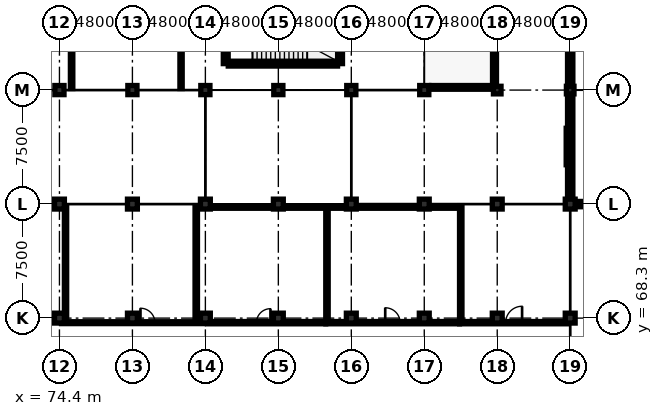
"""IFC4 building model, lengths in metres.
Left out: names, types, materials, properties, quantities, classifications, styles, units other than length and angle.
Written with IfcOpenShell. Run it as: python <this file> out.ifc"""

import sys

from ifc_helpers import new_model, si_unit, direction, frame, frame_2d, origin, origin_2d, place, context, subcontext, project, spatial, rectangle, circle, extrude, element, fill, save


model = new_model("IFC4")
c1 = context("Model", 3, precision=1e-05, world=origin(), true_north=direction((0.0, 1.0)))
c2 = subcontext(c1, "Body", "Model", "MODEL_VIEW")
j1 = project(units=[si_unit("LENGTHUNIT", "METRE"), si_unit("PLANEANGLEUNIT", "RADIAN")], contexts=[c1])
p1 = place(None, origin())
s1 = spatial("IfcSite", under=j1, at=p1, CompositionType="ELEMENT")
p2 = place(p1, origin())
s2 = spatial("IfcBuilding", under=s1, at=p2, CompositionType="ELEMENT")
p3 = place(p2, frame((0.0, 0.0, 5.0)))
s3 = spatial("IfcBuildingStorey", under=s2, at=p3, CompositionType="ELEMENT", Elevation=5.0)
for number, where, z_axis, x_axis in (
    (1, (74.4, 68.3, 0.0), (0.0, 0.0, 1.0), (1.0, 0.0, 0.0)),
    (2, (74.4, 75.8, 0.0), (0.0, 0.0, 1.0), (1.0, 0.0, 0.0)),
):
    element("IfcColumn", number, at=place(p3, frame(where, z_axis=z_axis, x_axis=x_axis)), inside=s3, PredefinedType="COLUMN", context=c2, shape_type="SweptSolid", body=[
        extrude(circle(Radius=0.325, at=origin_2d()), origin(), (0.0, 0.0, 1.0), 4.2),
    ])
p4 = place(p3, frame((74.4, 83.3, 0.0), z_axis=(0.0, 0.0, 1.0), x_axis=(1.0, 0.0, 0.0)))
e3 = element("IfcColumn", 3, at=p4, inside=s3, PredefinedType="COLUMN", context=c2, shape_type="SweptSolid", body=[
    extrude(rectangle(XDim=0.6, YDim=0.6, at=origin_2d()), origin(), (0.0, 0.0, 1.0), 4.2),
])
for number, where, z_axis, x_axis in (
    (4, (79.2, 68.3, 0.0), (0.0, 0.0, 1.0), (1.0, 0.0, 0.0)),
    (5, (79.2, 75.8, 0.0), (0.0, 0.0, 1.0), (1.0, 0.0, 0.0)),
):
    element("IfcColumn", number, at=place(p3, frame(where, z_axis=z_axis, x_axis=x_axis)), inside=s3, PredefinedType="COLUMN", context=c2, shape_type="SweptSolid", body=[
        extrude(circle(Radius=0.325, at=origin_2d()), origin(), (0.0, 0.0, 1.0), 4.2),
    ])
p5 = place(p3, frame((79.2, 83.3, 0.0), z_axis=(0.0, 0.0, 1.0), x_axis=(1.0, 0.0, 0.0)))
e6 = element("IfcColumn", 6, at=p5, inside=s3, PredefinedType="COLUMN", context=c2, shape_type="SweptSolid", body=[
    extrude(rectangle(XDim=0.6, YDim=0.6, at=origin_2d()), origin(), (0.0, 0.0, 1.0), 4.2),
])
for number, where, z_axis, x_axis in (
    (7, (84.0, 68.3, 0.0), (0.0, 0.0, 1.0), (1.0, 0.0, 0.0)),
    (8, (84.0, 75.8, 0.0), (0.0, 0.0, 1.0), (1.0, 0.0, 0.0)),
):
    element("IfcColumn", number, at=place(p3, frame(where, z_axis=z_axis, x_axis=x_axis)), inside=s3, PredefinedType="COLUMN", context=c2, shape_type="SweptSolid", body=[
        extrude(circle(Radius=0.325, at=origin_2d()), origin(), (0.0, 0.0, 1.0), 4.2),
    ])
p6 = place(p3, frame((84.0, 83.3, 0.0), z_axis=(0.0, 0.0, 1.0), x_axis=(1.0, 0.0, 0.0)))
e9 = element("IfcColumn", 9, at=p6, inside=s3, PredefinedType="COLUMN", context=c2, shape_type="SweptSolid", body=[
    extrude(rectangle(XDim=0.6, YDim=0.6, at=origin_2d()), origin(), (0.0, 0.0, 1.0), 4.2),
])
for number, where, z_axis, x_axis in (
    (10, (88.8, 68.3, 0.0), (0.0, 0.0, 1.0), (1.0, 0.0, 0.0)),
    (11, (88.8, 75.8, 0.0), (0.0, 0.0, 1.0), (1.0, 0.0, 0.0)),
):
    element("IfcColumn", number, at=place(p3, frame(where, z_axis=z_axis, x_axis=x_axis)), inside=s3, PredefinedType="COLUMN", context=c2, shape_type="SweptSolid", body=[
        extrude(circle(Radius=0.325, at=origin_2d()), origin(), (0.0, 0.0, 1.0), 4.2),
    ])
p7 = place(p3, frame((88.8, 83.3, 0.0), z_axis=(0.0, 0.0, 1.0), x_axis=(1.0, 0.0, 0.0)))
e12 = element("IfcColumn", 12, at=p7, inside=s3, PredefinedType="COLUMN", context=c2, shape_type="SweptSolid", body=[
    extrude(rectangle(XDim=0.6, YDim=0.6, at=origin_2d()), origin(), (0.0, 0.0, 1.0), 4.2),
])
for number, where, z_axis, x_axis in (
    (13, (93.6, 68.3, 0.0), (0.0, 0.0, 1.0), (1.0, 0.0, 0.0)),
    (14, (93.6, 75.8, 0.0), (0.0, 0.0, 1.0), (1.0, 0.0, 0.0)),
):
    element("IfcColumn", number, at=place(p3, frame(where, z_axis=z_axis, x_axis=x_axis)), inside=s3, PredefinedType="COLUMN", context=c2, shape_type="SweptSolid", body=[
        extrude(circle(Radius=0.325, at=origin_2d()), origin(), (0.0, 0.0, 1.0), 4.2),
    ])
p8 = place(p3, frame((93.6, 83.3, 0.0), z_axis=(0.0, 0.0, 1.0), x_axis=(1.0, 0.0, 0.0)))
e15 = element("IfcColumn", 15, at=p8, inside=s3, PredefinedType="COLUMN", context=c2, shape_type="SweptSolid", body=[
    extrude(rectangle(XDim=0.6, YDim=0.6, at=origin_2d()), origin(), (0.0, 0.0, 1.0), 4.2),
])
for number, where, z_axis, x_axis in (
    (16, (98.4, 68.3, 0.0), (0.0, 0.0, 1.0), (1.0, 0.0, 0.0)),
    (17, (98.4, 75.8, 0.0), (0.0, 0.0, 1.0), (1.0, 0.0, 0.0)),
):
    element("IfcColumn", number, at=place(p3, frame(where, z_axis=z_axis, x_axis=x_axis)), inside=s3, PredefinedType="COLUMN", context=c2, shape_type="SweptSolid", body=[
        extrude(circle(Radius=0.325, at=origin_2d()), origin(), (0.0, 0.0, 1.0), 4.2),
    ])
p9 = place(p3, frame((98.4, 83.3, 0.0), z_axis=(0.0, 0.0, 1.0), x_axis=(1.0, 0.0, 0.0)))
e18 = element("IfcColumn", 18, at=p9, inside=s3, PredefinedType="COLUMN", context=c2, shape_type="SweptSolid", body=[
    extrude(rectangle(XDim=0.6, YDim=0.6, at=origin_2d()), origin(), (0.0, 0.0, 1.0), 4.2),
])
for number, where, z_axis, x_axis in (
    (19, (103.2, 68.3, 0.0), (0.0, 0.0, 1.0), (1.0, 0.0, 0.0)),
    (20, (103.2, 75.8, 0.0), (0.0, 0.0, 1.0), (1.0, 0.0, 0.0)),
):
    element("IfcColumn", number, at=place(p3, frame(where, z_axis=z_axis, x_axis=x_axis)), inside=s3, PredefinedType="COLUMN", context=c2, shape_type="SweptSolid", body=[
        extrude(circle(Radius=0.325, at=origin_2d()), origin(), (0.0, 0.0, 1.0), 4.2),
    ])
p10 = place(p3, frame((103.2, 83.3, 0.0), z_axis=(0.0, 0.0, 1.0), x_axis=(1.0, 0.0, 0.0)))
e21 = element("IfcColumn", 21, at=p10, inside=s3, PredefinedType="COLUMN", context=c2, shape_type="SweptSolid", body=[
    extrude(rectangle(XDim=0.5, YDim=0.5, at=origin_2d()), origin(), (0.0, 0.0, 1.0), 4.2),
])
for number, where, z_axis, x_axis in (
    (22, (108.0, 68.3, 0.0), (0.0, 0.0, 1.0), (1.0, 0.0, 0.0)),
    (23, (108.0, 75.8, 0.0), (0.0, 0.0, 1.0), (1.0, 0.0, 0.0)),
):
    element("IfcColumn", number, at=place(p3, frame(where, z_axis=z_axis, x_axis=x_axis)), inside=s3, PredefinedType="COLUMN", context=c2, shape_type="SweptSolid", body=[
        extrude(circle(Radius=0.325, at=origin_2d()), origin(), (0.0, 0.0, 1.0), 4.2),
    ])
p11 = place(p3, frame((108.0, 83.3, 0.0), z_axis=(0.0, 0.0, 1.0), x_axis=(1.0, 0.0, 0.0)))
e24 = element("IfcColumn", 24, at=p11, inside=s3, PredefinedType="COLUMN", context=c2, shape_type="SweptSolid", body=[
    extrude(rectangle(XDim=0.5, YDim=0.5, at=origin_2d()), origin(), (0.0, 0.0, 1.0), 5.5),
])
p12 = place(p3, frame((108.0, 76.125, 0.0), z_axis=(0.0, 0.0, 1.0), x_axis=(0.0, 1.0, 0.0)))
e25 = element("IfcWall", 25, at=p12, inside=s3, PredefinedType="SOLIDWALL", context=c2, shape_type="SweptSolid", body=[
    extrude(rectangle(XDim=6.925, YDim=0.35, at=frame_2d((3.462, 0.0))), origin(), (0.0, 0.0, 1.0), 3.535),
])
p13 = place(p12, frame((2.663, 0.0, 0.9)))
e26 = element("IfcOpeningElement", 26, at=p13, cuts=e25, PredefinedType="OPENING", context=c2, shape_type="SweptSolid", body=[
    extrude(rectangle(XDim=1.6, YDim=1.9, at=frame_2d((0.8, 0.95))), frame((0.0, 0.187, 0.0), z_axis=(0.0, -1.0, 0.0), x_axis=(1.0, 0.0, 0.0)), (0.0, 0.0, 1.0), 0.374),
])
p14 = place(p3, frame((108.0, 83.55, 0.0), z_axis=(0.0, 0.0, 1.0), x_axis=(0.0, 1.0, 0.0)))
e27 = element("IfcWall", 27, at=p14, inside=s3, PredefinedType="SOLIDWALL", context=c2, shape_type="SweptSolid", body=[
    extrude(rectangle(XDim=7.0, YDim=0.35, at=frame_2d((3.5, 0.0))), origin(), (0.0, 0.0, 1.0), 4.2),
])
p15 = place(p3, frame((115.75, 75.8, 0.0), z_axis=(0.0, 0.0, 1.0), x_axis=(-1.0, 0.0, 0.0)))
e28 = element("IfcWall", 28, at=p15, inside=s3, PredefinedType="SOLIDWALL", context=c2, shape_type="SweptSolid", body=[
    extrude(rectangle(XDim=7.425, YDim=0.35, at=frame_2d((3.712, 0.0))), origin(), (0.0, 0.0, 1.0), 3.535),
])
p16 = place(p15, frame((2.613, 0.0, 0.9)))
e29 = element("IfcOpeningElement", 29, at=p16, cuts=e28, PredefinedType="OPENING", context=c2, shape_type="SweptSolid", body=[
    extrude(rectangle(XDim=2.2, YDim=1.7, at=frame_2d((1.1, 0.85))), frame((0.0, 0.187, 0.0), z_axis=(0.0, -1.0, 0.0), x_axis=(1.0, 0.0, 0.0)), (0.0, 0.0, 1.0), 0.374),
])
p17 = place(p3, frame((103.02, 112.82, 4.4), z_axis=(0.0, 0.0, 1.0), x_axis=(0.0, -1.0, 0.0)))
e30 = element("IfcWall", 30, at=p17, inside=s3, PredefinedType="PARAPET", context=c2, shape_type="SweptSolid", body=[
    extrude(rectangle(XDim=29.04, YDim=0.26, at=frame_2d((14.52, 0.0))), origin(), (0.0, 0.0, 1.0), 0.6),
])
p18 = place(p3, frame((102.72, 83.48, 4.4), z_axis=(0.0, 0.0, 1.0), x_axis=(-1.0, 0.0, 0.0)))
e31 = element("IfcWall", 31, at=p18, inside=s3, PredefinedType="PARAPET", context=c2, shape_type="SweptSolid", body=[
    extrude(rectangle(XDim=3.84, YDim=0.24, at=frame_2d((1.92, 0.0))), origin(), (0.0, 0.0, 1.0), 0.6),
])
p19 = place(p3, frame((85.505, 85.04, 0.0), z_axis=(0.0, 0.0, 1.0), x_axis=(1.0, 0.0, 0.0)))
e32 = element("IfcWall", 32, at=p19, inside=s3, PredefinedType="SHEAR", context=c2, shape_type="SweptSolid", body=[
    extrude(rectangle(XDim=7.19, YDim=0.32, at=frame_2d((3.595, 0.0))), origin(), (0.0, 0.0, 1.0), 4.2),
])
p20 = place(p3, frame((92.86, 85.04, 0.0), z_axis=(0.0, 0.0, 1.0), x_axis=(0.0, 1.0, 0.0)))
e33 = element("IfcWall", 33, at=p20, inside=s3, PredefinedType="SHEAR", context=c2, shape_type="SweptSolid", body=[
    extrude(rectangle(XDim=3.32, YDim=0.32, at=frame_2d((1.66, 0.0))), origin(), (0.0, 0.0, 1.0), 4.2),
])
p21 = place(p3, frame((85.34, 88.36, 0.0), z_axis=(0.0, 0.0, 1.0), x_axis=(0.0, -1.0, 0.0)))
e34 = element("IfcWall", 34, at=p21, inside=s3, PredefinedType="SHEAR", context=c2, shape_type="SweptSolid", body=[
    extrude(rectangle(XDim=3.32, YDim=0.32, at=frame_2d((1.66, 0.0))), origin(), (0.0, 0.0, 1.0), 4.2),
])
p22 = place(p21, frame((1.085, 0.0, 0.0)))
e35 = element("IfcOpeningElement", 35, at=p22, cuts=e34, PredefinedType="OPENING", context=c2, shape_type="SweptSolid", body=[
    extrude(rectangle(XDim=1.15, YDim=2.15, at=frame_2d((0.575, 1.075))), frame((0.0, 0.172, 0.0), z_axis=(0.0, -1.0, 0.0), x_axis=(1.0, 0.0, 0.0)), (0.0, 0.0, 1.0), 0.344),
])
p23 = place(p3, frame((74.537, 68.0, 0.0), z_axis=(0.0, 0.0, 1.0), x_axis=(1.0, 0.0, 0.0)))
e36 = element("IfcWall", 36, at=p23, inside=s3, PredefinedType="PARTITIONING", context=c2, shape_type="SweptSolid", body=[
    extrude(rectangle(XDim=9.326, YDim=0.125, at=frame_2d((4.663, 0.0))), origin(), (0.0, 0.0, 1.0), 3.14),
])
p24 = place(p23, frame((5.193, 0.0, 0.0)))
e37 = element("IfcOpeningElement", 37, at=p24, cuts=e36, PredefinedType="OPENING", context=c2, shape_type="SweptSolid", body=[
    extrude(rectangle(XDim=0.95, YDim=2.15, at=frame_2d((0.475, 1.075))), frame((0.0, 0.074, 0.0), z_axis=(0.0, -1.0, 0.0), x_axis=(1.0, 0.0, 0.0)), (0.0, 0.0, 1.0), 0.149),
])
p25 = place(p3, frame((84.137, 68.0, 0.0), z_axis=(0.0, 0.0, 1.0), x_axis=(1.0, 0.0, 0.0)))
e38 = element("IfcWall", 38, at=p25, inside=s3, PredefinedType="PARTITIONING", context=c2, shape_type="SweptSolid", body=[
    extrude(rectangle(XDim=7.778, YDim=0.15, at=frame_2d((3.889, 0.0))), origin(), (0.0, 0.0, 1.0), 3.14),
])
p26 = place(p25, frame((3.223, 0.0, 0.0)))
e39 = element("IfcOpeningElement", 39, at=p26, cuts=e38, PredefinedType="OPENING", context=c2, shape_type="SweptSolid", body=[
    extrude(rectangle(XDim=0.92, YDim=2.1, at=frame_2d((0.46, 1.05))), frame((0.0, 0.087, 0.0), z_axis=(0.0, -1.0, 0.0), x_axis=(1.0, 0.0, 0.0)), (0.0, 0.0, 1.0), 0.174),
])
p27 = place(p3, frame((91.927, 68.0, 0.0), z_axis=(0.0, 0.0, 1.0), x_axis=(1.0, 0.0, 0.0)))
e40 = element("IfcWall", 40, at=p27, inside=s3, PredefinedType="PARTITIONING", context=c2, shape_type="SweptSolid", body=[
    extrude(rectangle(XDim=8.788, YDim=0.15, at=frame_2d((4.394, 0.0))), origin(), (0.0, 0.0, 1.0), 3.14),
])
p28 = place(p27, frame((3.904, 0.0, 0.0)))
e41 = element("IfcOpeningElement", 41, at=p28, cuts=e40, PredefinedType="OPENING", context=c2, shape_type="SweptSolid", body=[
    extrude(rectangle(XDim=0.98, YDim=2.12, at=frame_2d((0.49, 1.06))), frame((0.0, 0.087, 0.0), z_axis=(0.0, -1.0, 0.0), x_axis=(1.0, 0.0, 0.0)), (0.0, 0.0, 1.0), 0.174),
])
p29 = place(p3, frame((100.727, 68.0, 0.0), z_axis=(0.0, 0.0, 1.0), x_axis=(1.0, 0.0, 0.0)))
e42 = element("IfcWall", 42, at=p29, inside=s3, PredefinedType="PARTITIONING", context=c2, shape_type="SweptSolid", body=[
    extrude(rectangle(XDim=7.136, YDim=0.15, at=frame_2d((3.568, 0.0))), origin(), (0.0, 0.0, 1.0), 3.14),
])
p30 = place(p29, frame((3.028, 0.0, 0.0)))
e43 = element("IfcOpeningElement", 43, at=p30, cuts=e42, PredefinedType="OPENING", context=c2, shape_type="SweptSolid", body=[
    extrude(rectangle(XDim=1.08, YDim=2.18, at=frame_2d((0.54, 1.09))), frame((0.0, 0.087, 0.0), z_axis=(0.0, -1.0, 0.0), x_axis=(1.0, 0.0, 0.0)), (0.0, 0.0, 1.0), 0.174),
])
p31 = place(p3, frame((83.485, 75.6, 0.0), z_axis=(0.0, 0.0, 1.0), x_axis=(1.0, 0.0, 0.0)))
e44 = element("IfcWall", 44, at=p31, inside=s3, PredefinedType="PARTITIONING", context=c2, shape_type="SweptSolid", body=[
    extrude(rectangle(XDim=8.43, YDim=0.15, at=frame_2d((4.215, 0.0))), origin(), (0.0, 0.0, 1.0), 3.14),
])
p32 = place(p3, frame((91.927, 75.6, 0.0), z_axis=(0.0, 0.0, 1.0), x_axis=(1.0, 0.0, 0.0)))
e45 = element("IfcWall", 45, at=p32, inside=s3, PredefinedType="PARTITIONING", context=c2, shape_type="SweptSolid", body=[
    extrude(rectangle(XDim=8.788, YDim=0.15, at=frame_2d((4.394, 0.0))), origin(), (0.0, 0.0, 1.0), 3.14),
])
p33 = place(p3, frame((74.8, 68.074, 0.0), z_axis=(0.0, 0.0, 1.0), x_axis=(0.0, 1.0, 0.0)))
e46 = element("IfcWall", 46, at=p33, inside=s3, PredefinedType="PARTITIONING", context=c2, shape_type="SweptSolid", body=[
    extrude(rectangle(XDim=7.624, YDim=0.15, at=frame_2d((3.812, 0.0))), origin(), (0.0, 0.0, 1.0), 3.14),
])
p34 = place(p3, frame((83.4, 68.074, 0.0), z_axis=(0.0, 0.0, 1.0), x_axis=(0.0, 1.0, 0.0)))
e47 = element("IfcWall", 47, at=p34, inside=s3, PredefinedType="PARTITIONING", context=c2, shape_type="SweptSolid", body=[
    extrude(rectangle(XDim=7.624, YDim=0.16, at=frame_2d((3.812, 0.0))), origin(), (0.0, 0.0, 1.0), 3.14),
])
p35 = place(p3, frame((92.0, 68.087, 0.0), z_axis=(0.0, 0.0, 1.0), x_axis=(0.0, 1.0, 0.0)))
e48 = element("IfcWall", 48, at=p35, inside=s3, PredefinedType="PARTITIONING", context=c2, shape_type="SweptSolid", body=[
    extrude(rectangle(XDim=7.426, YDim=0.16, at=frame_2d((3.713, 0.0))), origin(), (0.0, 0.0, 1.0), 3.14),
])
p36 = place(p3, frame((100.8, 68.087, 0.0), z_axis=(0.0, 0.0, 1.0), x_axis=(0.0, 1.0, 0.0)))
e49 = element("IfcWall", 49, at=p36, inside=s3, PredefinedType="PARTITIONING", context=c2, shape_type="SweptSolid", body=[
    extrude(rectangle(XDim=7.611, YDim=0.16, at=frame_2d((3.806, 0.0))), origin(), (0.0, 0.0, 1.0), 3.14),
])
p37 = place(p3, frame((75.2, 83.402, 0.0), z_axis=(0.0, 0.0, 1.0), x_axis=(0.0, 1.0, 0.0)))
e50 = element("IfcWall", 50, at=p37, inside=s3, PredefinedType="PARTITIONING", context=c2, shape_type="SweptSolid", body=[
    extrude(rectangle(XDim=9.711, YDim=0.16, at=frame_2d((4.855, 0.0))), origin(), (0.0, 0.0, 1.0), 3.535),
])
p38 = place(p3, frame((82.4, 83.402, 0.0), z_axis=(0.0, 0.0, 1.0), x_axis=(0.0, 1.0, 0.0)))
e51 = element("IfcWall", 51, at=p38, inside=s3, PredefinedType="PARTITIONING", context=c2, shape_type="SweptSolid", body=[
    extrude(rectangle(XDim=9.633, YDim=0.15, at=frame_2d((4.816, 0.0))), origin(), (0.0, 0.0, 1.0), 3.535),
])
p39 = place(p13, origin())
e52 = element("IfcWindow", 52, at=p39, inside=s3, PartitioningType="DOUBLE_PANEL_VERTICAL", PredefinedType="WINDOW", context=c2, shape_type="SweptSolid", body=[
    extrude(rectangle(XDim=1.6, YDim=1.9, at=frame_2d((0.8, 0.95))), frame((0.0, 0.03, 0.0), z_axis=(0.0, -1.0, 0.0), x_axis=(1.0, 0.0, 0.0)), (0.0, 0.0, 1.0), 0.06),
])
fill(e26, e52)
p40 = place(p24, origin())
e53 = element("IfcDoor", 53, at=p40, inside=s3, OperationType="SINGLE_SWING_LEFT", PredefinedType="DOOR", context=c2, shape_type="SweptSolid", body=[
    extrude(rectangle(XDim=0.95, YDim=2.15, at=frame_2d((0.475, 1.075))), frame((0.0, 0.025, 0.0), z_axis=(0.0, -1.0, 0.0), x_axis=(1.0, 0.0, 0.0)), (0.0, 0.0, 1.0), 0.05),
])
fill(e37, e53)
p41 = place(p26, origin())
e54 = element("IfcDoor", 54, at=p41, inside=s3, OperationType="SINGLE_SWING_RIGHT", PredefinedType="DOOR", context=c2, shape_type="SweptSolid", body=[
    extrude(rectangle(XDim=0.92, YDim=2.1, at=frame_2d((0.46, 1.05))), frame((0.0, 0.025, 0.0), z_axis=(0.0, -1.0, 0.0), x_axis=(1.0, 0.0, 0.0)), (0.0, 0.0, 1.0), 0.05),
])
fill(e39, e54)
p42 = place(p28, origin())
e55 = element("IfcDoor", 55, at=p42, inside=s3, OperationType="SINGLE_SWING_LEFT", PredefinedType="DOOR", context=c2, shape_type="SweptSolid", body=[
    extrude(rectangle(XDim=0.98, YDim=2.12, at=frame_2d((0.49, 1.06))), frame((0.0, 0.025, 0.0), z_axis=(0.0, -1.0, 0.0), x_axis=(1.0, 0.0, 0.0)), (0.0, 0.0, 1.0), 0.05),
])
fill(e41, e55)
p43 = place(p30, origin())
e56 = element("IfcDoor", 56, at=p43, inside=s3, OperationType="SINGLE_SWING_RIGHT", PredefinedType="DOOR", context=c2, shape_type="SweptSolid", body=[
    extrude(rectangle(XDim=1.08, YDim=2.18, at=frame_2d((0.54, 1.09))), frame((0.0, 0.025, 0.0), z_axis=(0.0, -1.0, 0.0), x_axis=(1.0, 0.0, 0.0)), (0.0, 0.0, 1.0), 0.05),
])
fill(e43, e56)
save(model, sys.argv[1])
